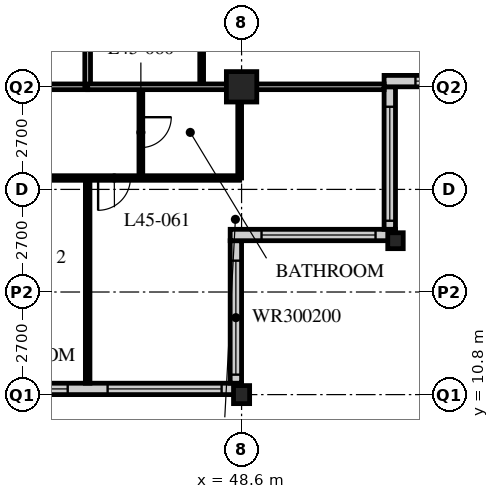
"""IFC4 building model, lengths in metres.
Left out: names, types, materials, properties, quantities, classifications, styles, units other than length and angle.
Written with IfcOpenShell. Run it as: python <this file> out.ifc"""

import sys

from ifc_helpers import new_model, si_unit, direction, frame, frame_2d, origin, origin_2d, place, context, subcontext, project, spatial, rectangle, hollow_rectangle, i_section, extrude, element, fill, save


model = new_model("IFC4")
c1 = context("Model", 3, precision=1e-05, world=origin(), true_north=direction((0.0, 1.0)))
c2 = subcontext(c1, "Body", "Model", "MODEL_VIEW")
j1 = project(units=[si_unit("LENGTHUNIT", "METRE"), si_unit("PLANEANGLEUNIT", "RADIAN")], contexts=[c1])
p1 = place(None, origin())
s1 = spatial("IfcSite", under=j1, at=p1, CompositionType="ELEMENT")
p2 = place(p1, origin())
s2 = spatial("IfcBuilding", under=s1, at=p2, CompositionType="ELEMENT")
p3 = place(p2, frame((0.0, 0.0, 177.6)))
s3 = spatial("IfcBuildingStorey", under=s2, at=p3, CompositionType="ELEMENT", Elevation=177.6)
p4 = place(p3, frame((48.6, 10.8, 0.0), z_axis=(0.0, 0.0, 1.0), x_axis=(1.0, 0.0, 0.0)))
e1 = element("IfcColumn", 1, at=p4, inside=s3, PredefinedType="COLUMN", context=c2, shape_type="SweptSolid", body=[
    extrude(i_section(OverallWidth=0.424, OverallDepth=0.475, WebThickness=0.048, FlangeThickness=0.077, FilletRadius=0.015, at=origin_2d()), origin(), (0.0, 0.0, 1.0), 3.6),
])
p5 = place(p3, frame((48.6, 18.9, 0.0), z_axis=(0.0, 0.0, 1.0), x_axis=(1.0, 0.0, 0.0)))
e2 = element("IfcColumn", 2, at=p5, inside=s3, PredefinedType="COLUMN", context=c2, shape_type="SweptSolid", body=[
    extrude(hollow_rectangle(XDim=0.8, YDim=0.8, WallThickness=0.08, at=origin_2d()), origin(), (0.0, 0.0, 1.0), 3.6),
])
p6 = place(p3, frame((52.65, 14.85, 0.0), z_axis=(0.0, 0.0, 1.0), x_axis=(1.0, 0.0, 0.0)))
e3 = element("IfcColumn", 3, at=p6, inside=s3, PredefinedType="COLUMN", context=c2, shape_type="SweptSolid", body=[
    extrude(i_section(OverallWidth=0.407, OverallDepth=0.419, WebThickness=0.031, FlangeThickness=0.049, FilletRadius=0.015, at=origin_2d()), origin(), (0.0, 0.0, 1.0), 3.6),
])
p7 = place(p3, frame((8.4, 10.95, 0.0), z_axis=(0.0, 0.0, 1.0), x_axis=(1.0, 0.0, 0.0)))
e4 = element("IfcWall", 4, at=p7, inside=s3, PredefinedType="SOLIDWALL", context=c2, shape_type="SweptSolid", body=[
    extrude(rectangle(XDim=40.2, YDim=0.3, at=frame_2d((20.1, 0.0))), origin(), (0.0, 0.0, 1.0), 3.39),
])
p8 = place(p7, frame((0.225, 0.0, 0.6)))
e5 = element("IfcOpeningElement", 5, at=p8, cuts=e4, PredefinedType="OPENING", context=c2, shape_type="SweptSolid", body=[
    extrude(rectangle(XDim=3.0, YDim=2.4, at=frame_2d((1.5, 1.2))), frame((0.0, 0.16, 0.0), z_axis=(0.0, -1.0, 0.0), x_axis=(1.0, 0.0, 0.0)), (0.0, 0.0, 1.0), 0.32),
])
p9 = place(p7, frame((4.275, 0.0, 0.6)))
e6 = element("IfcOpeningElement", 6, at=p9, cuts=e4, PredefinedType="OPENING", context=c2, shape_type="SweptSolid", body=[
    extrude(rectangle(XDim=3.0, YDim=2.4, at=frame_2d((1.5, 1.2))), frame((0.0, 0.16, 0.0), z_axis=(0.0, -1.0, 0.0), x_axis=(1.0, 0.0, 0.0)), (0.0, 0.0, 1.0), 0.32),
])
p10 = place(p7, frame((8.325, 0.0, 0.6)))
e7 = element("IfcOpeningElement", 7, at=p10, cuts=e4, PredefinedType="OPENING", context=c2, shape_type="SweptSolid", body=[
    extrude(rectangle(XDim=3.0, YDim=2.4, at=frame_2d((1.5, 1.2))), frame((0.0, 0.16, 0.0), z_axis=(0.0, -1.0, 0.0), x_axis=(1.0, 0.0, 0.0)), (0.0, 0.0, 1.0), 0.32),
])
p11 = place(p7, frame((12.375, 0.0, 0.6)))
e8 = element("IfcOpeningElement", 8, at=p11, cuts=e4, PredefinedType="OPENING", context=c2, shape_type="SweptSolid", body=[
    extrude(rectangle(XDim=3.0, YDim=2.4, at=frame_2d((1.5, 1.2))), frame((0.0, 0.16, 0.0), z_axis=(0.0, -1.0, 0.0), x_axis=(1.0, 0.0, 0.0)), (0.0, 0.0, 1.0), 0.32),
])
p12 = place(p7, frame((16.425, 0.0, 0.6)))
e9 = element("IfcOpeningElement", 9, at=p12, cuts=e4, PredefinedType="OPENING", context=c2, shape_type="SweptSolid", body=[
    extrude(rectangle(XDim=3.0, YDim=2.4, at=frame_2d((1.5, 1.2))), frame((0.0, 0.16, 0.0), z_axis=(0.0, -1.0, 0.0), x_axis=(1.0, 0.0, 0.0)), (0.0, 0.0, 1.0), 0.32),
])
p13 = place(p7, frame((20.475, 0.0, 0.6)))
e10 = element("IfcOpeningElement", 10, at=p13, cuts=e4, PredefinedType="OPENING", context=c2, shape_type="SweptSolid", body=[
    extrude(rectangle(XDim=3.0, YDim=2.4, at=frame_2d((1.5, 1.2))), frame((0.0, 0.16, 0.0), z_axis=(0.0, -1.0, 0.0), x_axis=(1.0, 0.0, 0.0)), (0.0, 0.0, 1.0), 0.32),
])
p14 = place(p7, frame((24.525, 0.0, 0.6)))
e11 = element("IfcOpeningElement", 11, at=p14, cuts=e4, PredefinedType="OPENING", context=c2, shape_type="SweptSolid", body=[
    extrude(rectangle(XDim=3.0, YDim=2.4, at=frame_2d((1.5, 1.2))), frame((0.0, 0.16, 0.0), z_axis=(0.0, -1.0, 0.0), x_axis=(1.0, 0.0, 0.0)), (0.0, 0.0, 1.0), 0.32),
])
p15 = place(p7, frame((28.575, 0.0, 0.6)))
e12 = element("IfcOpeningElement", 12, at=p15, cuts=e4, PredefinedType="OPENING", context=c2, shape_type="SweptSolid", body=[
    extrude(rectangle(XDim=3.0, YDim=2.4, at=frame_2d((1.5, 1.2))), frame((0.0, 0.16, 0.0), z_axis=(0.0, -1.0, 0.0), x_axis=(1.0, 0.0, 0.0)), (0.0, 0.0, 1.0), 0.32),
])
p16 = place(p7, frame((32.625, 0.0, 0.6)))
e13 = element("IfcOpeningElement", 13, at=p16, cuts=e4, PredefinedType="OPENING", context=c2, shape_type="SweptSolid", body=[
    extrude(rectangle(XDim=3.0, YDim=2.4, at=frame_2d((1.5, 1.2))), frame((0.0, 0.16, 0.0), z_axis=(0.0, -1.0, 0.0), x_axis=(1.0, 0.0, 0.0)), (0.0, 0.0, 1.0), 0.32),
])
p17 = place(p7, frame((36.675, 0.0, 0.6)))
e14 = element("IfcOpeningElement", 14, at=p17, cuts=e4, PredefinedType="OPENING", context=c2, shape_type="SweptSolid", body=[
    extrude(rectangle(XDim=3.0, YDim=2.4, at=frame_2d((1.5, 1.2))), frame((0.0, 0.16, 0.0), z_axis=(0.0, -1.0, 0.0), x_axis=(1.0, 0.0, 0.0)), (0.0, 0.0, 1.0), 0.32),
])
p18 = place(p3, frame((48.45, 11.1, 0.0), z_axis=(0.0, 0.0, 1.0), x_axis=(0.0, 1.0, 0.0)))
e15 = element("IfcWall", 15, at=p18, inside=s3, PredefinedType="SOLIDWALL", context=c2, shape_type="SweptSolid", body=[
    extrude(rectangle(XDim=3.75, YDim=0.3, at=frame_2d((1.875, 0.0))), origin(), (0.0, 0.0, 1.0), 3.39),
])
p19 = place(p18, frame((0.225, 0.0, 0.6)))
e16 = element("IfcOpeningElement", 16, at=p19, cuts=e15, PredefinedType="OPENING", context=c2, shape_type="SweptSolid", body=[
    extrude(rectangle(XDim=3.0, YDim=2.0, at=frame_2d((1.5, 1.0))), frame((0.0, 0.16, 0.0), z_axis=(0.0, -1.0, 0.0), x_axis=(1.0, 0.0, 0.0)), (0.0, 0.0, 1.0), 0.32),
])
p20 = place(p3, frame((48.3, 15.0, 0.0), z_axis=(0.0, 0.0, 1.0), x_axis=(1.0, 0.0, 0.0)))
e17 = element("IfcWall", 17, at=p20, inside=s3, PredefinedType="SOLIDWALL", context=c2, shape_type="SweptSolid", body=[
    extrude(rectangle(XDim=4.35, YDim=0.3, at=frame_2d((2.175, 0.0))), origin(), (0.0, 0.0, 1.0), 3.39),
])
p21 = place(p20, frame((0.825, 0.0, 0.6)))
e18 = element("IfcOpeningElement", 18, at=p21, cuts=e17, PredefinedType="OPENING", context=c2, shape_type="SweptSolid", body=[
    extrude(rectangle(XDim=3.0, YDim=2.0, at=frame_2d((1.5, 1.0))), frame((0.0, 0.16, 0.0), z_axis=(0.0, -1.0, 0.0), x_axis=(1.0, 0.0, 0.0)), (0.0, 0.0, 1.0), 0.32),
])
p22 = place(p3, frame((52.5, 15.15, 0.0), z_axis=(0.0, 0.0, 1.0), x_axis=(0.0, 1.0, 0.0)))
e19 = element("IfcWall", 19, at=p22, inside=s3, PredefinedType="SOLIDWALL", context=c2, shape_type="SweptSolid", body=[
    extrude(rectangle(XDim=3.75, YDim=0.3, at=frame_2d((1.875, 0.0))), origin(), (0.0, 0.0, 1.0), 3.39),
])
p23 = place(p22, frame((0.225, 0.0, 0.6)))
e20 = element("IfcOpeningElement", 20, at=p23, cuts=e19, PredefinedType="OPENING", context=c2, shape_type="SweptSolid", body=[
    extrude(rectangle(XDim=3.0, YDim=2.0, at=frame_2d((1.5, 1.0))), frame((0.0, 0.16, 0.0), z_axis=(0.0, -1.0, 0.0), x_axis=(1.0, 0.0, 0.0)), (0.0, 0.0, 1.0), 0.32),
])
p24 = place(p3, frame((52.35, 19.05, 0.0), z_axis=(0.0, 0.0, 1.0), x_axis=(1.0, 0.0, 0.0)))
e21 = element("IfcWall", 21, at=p24, inside=s3, PredefinedType="SOLIDWALL", context=c2, shape_type="SweptSolid", body=[
    extrude(rectangle(XDim=4.35, YDim=0.3, at=frame_2d((2.175, 0.0))), origin(), (0.0, 0.0, 1.0), 3.39),
])
p25 = place(p24, frame((0.825, 0.0, 0.6)))
e22 = element("IfcOpeningElement", 22, at=p25, cuts=e21, PredefinedType="OPENING", context=c2, shape_type="SweptSolid", body=[
    extrude(rectangle(XDim=3.0, YDim=2.0, at=frame_2d((1.5, 1.0))), frame((0.0, 0.16, 0.0), z_axis=(0.0, -1.0, 0.0), x_axis=(1.0, 0.0, 0.0)), (0.0, 0.0, 1.0), 0.32),
])
p26 = place(p3, frame((12.15, 18.9, 0.0), z_axis=(0.0, 0.0, 1.0), x_axis=(1.0, 0.0, 0.0)))
e23 = element("IfcWall", 23, at=p26, inside=s3, PredefinedType="PARTITIONING", context=c2, shape_type="SweptSolid", body=[
    extrude(rectangle(XDim=32.4, YDim=0.15, at=frame_2d((16.2, 0.0))), origin(), (0.0, 0.0, 1.0), 2.778),
])
p27 = place(p26, frame((6.4, 0.0, 0.0)))
e24 = element("IfcOpeningElement", 24, at=p27, cuts=e23, PredefinedType="OPENING", context=c2, shape_type="SweptSolid", body=[
    extrude(rectangle(XDim=1.0, YDim=2.1, at=frame_2d((0.5, 1.05))), frame((0.0, 0.085, 0.0), z_axis=(0.0, -1.0, 0.0), x_axis=(1.0, 0.0, 0.0)), (0.0, 0.0, 1.0), 0.17),
])
p28 = place(p26, frame((8.8, 0.0, 0.0)))
e25 = element("IfcOpeningElement", 25, at=p28, cuts=e23, PredefinedType="OPENING", context=c2, shape_type="SweptSolid", body=[
    extrude(rectangle(XDim=1.0, YDim=2.1, at=frame_2d((0.5, 1.05))), frame((0.0, 0.085, 0.0), z_axis=(0.0, -1.0, 0.0), x_axis=(1.0, 0.0, 0.0)), (0.0, 0.0, 1.0), 0.17),
])
p29 = place(p26, frame((13.05, 0.0, 0.0)))
e26 = element("IfcOpeningElement", 26, at=p29, cuts=e23, PredefinedType="OPENING", context=c2, shape_type="SweptSolid", body=[
    extrude(rectangle(XDim=1.0, YDim=2.1, at=frame_2d((0.5, 1.05))), frame((0.0, 0.085, 0.0), z_axis=(0.0, -1.0, 0.0), x_axis=(1.0, 0.0, 0.0)), (0.0, 0.0, 1.0), 0.17),
])
p30 = place(p26, frame((22.6, 0.0, 0.0)))
e27 = element("IfcOpeningElement", 27, at=p30, cuts=e23, PredefinedType="OPENING", context=c2, shape_type="SweptSolid", body=[
    extrude(rectangle(XDim=1.0, YDim=2.1, at=frame_2d((0.5, 1.05))), frame((0.0, 0.085, 0.0), z_axis=(0.0, -1.0, 0.0), x_axis=(1.0, 0.0, 0.0)), (0.0, 0.0, 1.0), 0.17),
])
p31 = place(p26, frame((25.0, 0.0, 0.0)))
e28 = element("IfcOpeningElement", 28, at=p31, cuts=e23, PredefinedType="OPENING", context=c2, shape_type="SweptSolid", body=[
    extrude(rectangle(XDim=1.0, YDim=2.1, at=frame_2d((0.5, 1.05))), frame((0.0, 0.085, 0.0), z_axis=(0.0, -1.0, 0.0), x_axis=(1.0, 0.0, 0.0)), (0.0, 0.0, 1.0), 0.17),
])
p32 = place(p26, frame((1.525, 0.0, 0.0)))
e29 = element("IfcOpeningElement", 29, at=p32, cuts=e23, PredefinedType="OPENING", context=c2, shape_type="SweptSolid", body=[
    extrude(rectangle(XDim=1.0, YDim=2.1, at=frame_2d((0.5, 1.05))), frame((0.0, 0.085, 0.0), z_axis=(0.0, -1.0, 0.0), x_axis=(1.0, 0.0, 0.0)), (0.0, 0.0, 1.0), 0.17),
])
p33 = place(p26, frame((29.875, 0.0, 0.0)))
e30 = element("IfcOpeningElement", 30, at=p33, cuts=e23, PredefinedType="OPENING", context=c2, shape_type="SweptSolid", body=[
    extrude(rectangle(XDim=1.0, YDim=2.1, at=frame_2d((0.5, 1.05))), frame((0.0, 0.085, 0.0), z_axis=(0.0, -1.0, 0.0), x_axis=(1.0, 0.0, 0.0)), (0.0, 0.0, 1.0), 0.17),
])
p34 = place(p3, frame((44.55, 18.9, 0.0), z_axis=(0.0, 0.0, 1.0), x_axis=(0.0, 1.0, 0.0)))
e31 = element("IfcWall", 31, at=p34, inside=s3, PredefinedType="PARTITIONING", context=c2, shape_type="SweptSolid", body=[
    extrude(rectangle(XDim=24.3, YDim=0.15, at=frame_2d((12.15, 0.0))), origin(), (0.0, 0.0, 1.0), 3.39),
])
p35 = place(p34, frame((2.35, 0.0, 0.0)))
e32 = element("IfcOpeningElement", 32, at=p35, cuts=e31, PredefinedType="OPENING", context=c2, shape_type="SweptSolid", body=[
    extrude(rectangle(XDim=1.0, YDim=2.1, at=frame_2d((0.5, 1.05))), frame((0.0, 0.085, 0.0), z_axis=(0.0, -1.0, 0.0), x_axis=(1.0, 0.0, 0.0)), (0.0, 0.0, 1.0), 0.17),
])
p36 = place(p34, frame((4.45, 0.0, 0.0)))
e33 = element("IfcOpeningElement", 33, at=p36, cuts=e31, PredefinedType="OPENING", context=c2, shape_type="SweptSolid", body=[
    extrude(rectangle(XDim=1.0, YDim=2.1, at=frame_2d((0.5, 1.05))), frame((0.0, 0.085, 0.0), z_axis=(0.0, -1.0, 0.0), x_axis=(1.0, 0.0, 0.0)), (0.0, 0.0, 1.0), 0.17),
])
p37 = place(p34, frame((18.55, 0.0, 0.0)))
e34 = element("IfcOpeningElement", 34, at=p37, cuts=e31, PredefinedType="OPENING", context=c2, shape_type="SweptSolid", body=[
    extrude(rectangle(XDim=1.0, YDim=2.1, at=frame_2d((0.5, 1.05))), frame((0.0, 0.085, 0.0), z_axis=(0.0, -1.0, 0.0), x_axis=(1.0, 0.0, 0.0)), (0.0, 0.0, 1.0), 0.17),
])
p38 = place(p34, frame((22.6, 0.0, 0.0)))
e35 = element("IfcOpeningElement", 35, at=p38, cuts=e31, PredefinedType="OPENING", context=c2, shape_type="SweptSolid", body=[
    extrude(rectangle(XDim=1.0, YDim=2.1, at=frame_2d((0.5, 1.05))), frame((0.0, 0.085, 0.0), z_axis=(0.0, -1.0, 0.0), x_axis=(1.0, 0.0, 0.0)), (0.0, 0.0, 1.0), 0.17),
])
p39 = place(p3, frame((47.55, 18.9, 0.0), z_axis=(0.0, 0.0, 1.0), x_axis=(0.0, 1.0, 0.0)))
e36 = element("IfcWall", 36, at=p39, inside=s3, PredefinedType="PARTITIONING", context=c2, shape_type="SweptSolid", body=[
    extrude(rectangle(XDim=2.2, YDim=0.1, at=frame_2d((1.1, 0.0))), origin(), (0.0, 0.0, 1.0), 3.39),
])
p40 = place(p3, frame((40.5, 16.5, 0.0), z_axis=(0.0, 0.0, 1.0), x_axis=(1.0, 0.0, 0.0)))
e37 = element("IfcWall", 37, at=p40, inside=s3, PredefinedType="PARTITIONING", context=c2, shape_type="SweptSolid", body=[
    extrude(rectangle(XDim=8.05, YDim=0.12, at=frame_2d((4.025, 0.0))), origin(), (0.0, 0.0, 1.0), 3.39),
])
p41 = place(p40, frame((0.475, 0.0, 0.0)))
e38 = element("IfcOpeningElement", 38, at=p41, cuts=e37, PredefinedType="OPENING", context=c2, shape_type="SweptSolid", body=[
    extrude(rectangle(XDim=0.85, YDim=2.1, at=frame_2d((0.425, 1.05))), frame((0.0, 0.07, 0.0), z_axis=(0.0, -1.0, 0.0), x_axis=(1.0, 0.0, 0.0)), (0.0, 0.0, 1.0), 0.14),
])
p42 = place(p40, frame((4.325, 0.0, 0.0)))
e39 = element("IfcOpeningElement", 39, at=p42, cuts=e37, PredefinedType="OPENING", context=c2, shape_type="SweptSolid", body=[
    extrude(rectangle(XDim=0.85, YDim=2.1, at=frame_2d((0.425, 1.05))), frame((0.0, 0.07, 0.0), z_axis=(0.0, -1.0, 0.0), x_axis=(1.0, 0.0, 0.0)), (0.0, 0.0, 1.0), 0.14),
])
p43 = place(p3, frame((45.95, 18.9, 0.0), z_axis=(0.0, 0.0, 1.0), x_axis=(0.0, -1.0, 0.0)))
e40 = element("IfcWall", 40, at=p43, inside=s3, PredefinedType="PARTITIONING", context=c2, shape_type="SweptSolid", body=[
    extrude(rectangle(XDim=2.4, YDim=0.1, at=frame_2d((1.2, 0.0))), origin(), (0.0, 0.0, 1.0), 3.39),
])
p44 = place(p43, frame((0.8, 0.0, 0.0)))
e41 = element("IfcOpeningElement", 41, at=p44, cuts=e40, PredefinedType="OPENING", context=c2, shape_type="SweptSolid", body=[
    extrude(rectangle(XDim=0.8, YDim=2.1, at=frame_2d((0.4, 1.05))), frame((0.0, 0.06, 0.0), z_axis=(0.0, -1.0, 0.0), x_axis=(1.0, 0.0, 0.0)), (0.0, 0.0, 1.0), 0.12),
])
p45 = place(p3, frame((48.55, 18.9, 0.0), z_axis=(0.0, 0.0, 1.0), x_axis=(0.0, -1.0, 0.0)))
e42 = element("IfcWall", 42, at=p45, inside=s3, PredefinedType="PARTITIONING", context=c2, shape_type="SweptSolid", body=[
    extrude(rectangle(XDim=2.4, YDim=0.1, at=frame_2d((1.2, 0.0))), origin(), (0.0, 0.0, 1.0), 2.778),
])
p46 = place(p3, frame((44.55, 16.5, 0.0), z_axis=(0.0, 0.0, 1.0), x_axis=(0.0, -1.0, 0.0)))
e43 = element("IfcWall", 43, at=p46, inside=s3, PredefinedType="PARTITIONING", context=c2, shape_type="SweptSolid", body=[
    extrude(rectangle(XDim=5.4, YDim=0.12, at=frame_2d((2.7, 0.0))), origin(), (0.0, 0.0, 1.0), 3.39),
])
p47 = place(p3, frame((44.55, 18.9, 0.0), z_axis=(0.0, 0.0, 1.0), x_axis=(1.0, 0.0, 0.0)))
e44 = element("IfcWall", 44, at=p47, inside=s3, PredefinedType="PARTITIONING", context=c2, shape_type="SweptSolid", body=[
    extrude(rectangle(XDim=7.8, YDim=0.15, at=frame_2d((3.9, 0.0))), origin(), (0.0, 0.0, 1.0), 2.778),
])
p48 = place(p16, origin())
e45 = element("IfcWindow", 45, at=p48, inside=s3, PartitioningType="SINGLE_PANEL", PredefinedType="WINDOW", context=c2, shape_type="SweptSolid", body=[
    extrude(rectangle(XDim=3.0, YDim=2.4, at=frame_2d((1.5, 1.2))), frame((0.0, 0.03, 0.0), z_axis=(0.0, -1.0, 0.0), x_axis=(1.0, 0.0, 0.0)), (0.0, 0.0, 1.0), 0.06),
])
fill(e13, e45)
p49 = place(p17, origin())
e46 = element("IfcWindow", 46, at=p49, inside=s3, PartitioningType="SINGLE_PANEL", PredefinedType="WINDOW", context=c2, shape_type="SweptSolid", body=[
    extrude(rectangle(XDim=3.0, YDim=2.4, at=frame_2d((1.5, 1.2))), frame((0.0, 0.03, 0.0), z_axis=(0.0, -1.0, 0.0), x_axis=(1.0, 0.0, 0.0)), (0.0, 0.0, 1.0), 0.06),
])
fill(e14, e46)
p50 = place(p19, origin())
e47 = element("IfcWindow", 47, at=p50, inside=s3, PartitioningType="SINGLE_PANEL", PredefinedType="WINDOW", context=c2, shape_type="SweptSolid", body=[
    extrude(rectangle(XDim=3.0, YDim=2.0, at=frame_2d((1.5, 1.0))), frame((0.0, 0.03, 0.0), z_axis=(0.0, -1.0, 0.0), x_axis=(1.0, 0.0, 0.0)), (0.0, 0.0, 1.0), 0.06),
])
fill(e16, e47)
p51 = place(p21, origin())
e48 = element("IfcWindow", 48, at=p51, inside=s3, PartitioningType="SINGLE_PANEL", PredefinedType="WINDOW", context=c2, shape_type="SweptSolid", body=[
    extrude(rectangle(XDim=3.0, YDim=2.0, at=frame_2d((1.5, 1.0))), frame((0.0, 0.03, 0.0), z_axis=(0.0, -1.0, 0.0), x_axis=(1.0, 0.0, 0.0)), (0.0, 0.0, 1.0), 0.06),
])
fill(e18, e48)
p52 = place(p23, origin())
e49 = element("IfcWindow", 49, at=p52, inside=s3, PartitioningType="SINGLE_PANEL", PredefinedType="WINDOW", context=c2, shape_type="SweptSolid", body=[
    extrude(rectangle(XDim=3.0, YDim=2.0, at=frame_2d((1.5, 1.0))), frame((0.0, 0.03, 0.0), z_axis=(0.0, -1.0, 0.0), x_axis=(1.0, 0.0, 0.0)), (0.0, 0.0, 1.0), 0.06),
])
fill(e20, e49)
p53 = place(p25, origin())
e50 = element("IfcWindow", 50, at=p53, inside=s3, PartitioningType="SINGLE_PANEL", PredefinedType="WINDOW", context=c2, shape_type="SweptSolid", body=[
    extrude(rectangle(XDim=3.0, YDim=2.0, at=frame_2d((1.5, 1.0))), frame((0.0, 0.03, 0.0), z_axis=(0.0, -1.0, 0.0), x_axis=(1.0, 0.0, 0.0)), (0.0, 0.0, 1.0), 0.06),
])
fill(e22, e50)
p54 = place(p44, origin())
e51 = element("IfcDoor", 51, at=p54, inside=s3, OperationType="SINGLE_SWING_LEFT", PredefinedType="DOOR", context=c2, shape_type="SweptSolid", body=[
    extrude(rectangle(XDim=0.8, YDim=2.1, at=frame_2d((0.4, 1.05))), frame((0.0, 0.025, 0.0), z_axis=(0.0, -1.0, 0.0), x_axis=(1.0, 0.0, 0.0)), (0.0, 0.0, 1.0), 0.05),
])
fill(e41, e51)
p55 = place(p42, origin())
e52 = element("IfcDoor", 52, at=p55, inside=s3, OperationType="SINGLE_SWING_RIGHT", PredefinedType="DOOR", context=c2, shape_type="SweptSolid", body=[
    extrude(rectangle(XDim=0.85, YDim=2.1, at=frame_2d((0.425, 1.05))), frame((0.0, 0.025, 0.0), z_axis=(0.0, -1.0, 0.0), x_axis=(1.0, 0.0, 0.0)), (0.0, 0.0, 1.0), 0.05),
])
fill(e39, e52)
save(model, sys.argv[1])
